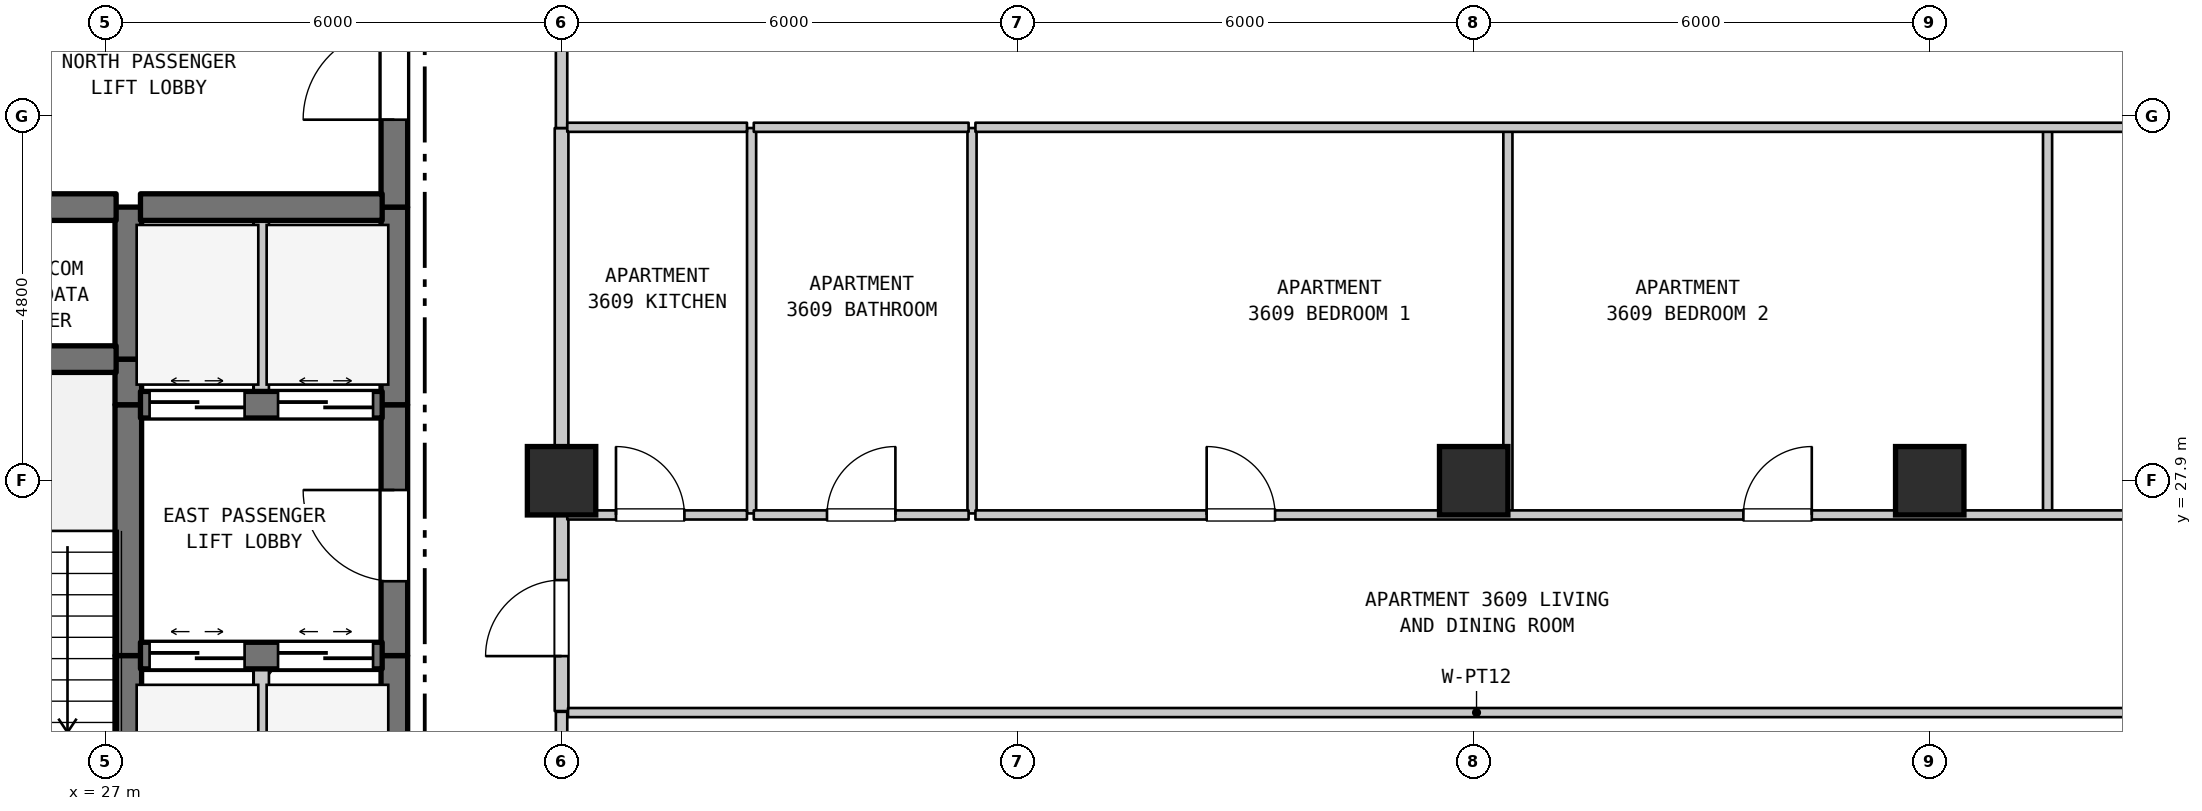
"""IFC4 building model, lengths in metres.
Left out: names, types, materials, properties, quantities, classifications, styles, units other than length and angle.
Written with IfcOpenShell. Run it as: python <this file> out.ifc"""

import sys

from ifc_helpers import new_model, si_unit, direction, frame, frame_2d, origin, origin_2d, place, context, subcontext, project, spatial, rectangle, extrude, element, fill, save


model = new_model("IFC4")
c1 = context("Model", 3, precision=1e-05, world=origin(), true_north=direction((0.0, 1.0)))
c2 = subcontext(c1, "Body", "Model", "MODEL_VIEW")
j1 = project(units=[si_unit("LENGTHUNIT", "METRE"), si_unit("PLANEANGLEUNIT", "RADIAN")], contexts=[c1])
p1 = place(None, origin())
s1 = spatial("IfcSite", under=j1, at=p1, CompositionType="ELEMENT")
p2 = place(p1, origin())
s2 = spatial("IfcBuilding", under=s1, at=p2, CompositionType="ELEMENT")
p3 = place(p2, frame((0.0, 0.0, 148.3)))
s3 = spatial("IfcBuildingStorey", under=s2, at=p3, CompositionType="ELEMENT", Elevation=148.3)
for number, where, z_axis, x_axis in (
    (1, (33.0, 27.9, 0.0), (0.0, 0.0, 1.0), (1.0, 0.0, 0.0)),
    (2, (45.0, 27.9, 0.0), (0.0, 0.0, 1.0), (1.0, 0.0, 0.0)),
    (3, (51.0, 27.9, 0.0), (0.0, 0.0, 1.0), (1.0, 0.0, 0.0)),
):
    element("IfcColumn", number, at=place(p3, frame(where, z_axis=z_axis, x_axis=x_axis)), inside=s3, PredefinedType="COLUMN", context=c2, shape_type="SweptSolid", body=[
        extrude(rectangle(XDim=0.9, YDim=0.9, at=origin_2d()), origin(), (0.0, 0.0, 1.0), 3.7),
    ])
p4 = place(p3, frame((27.3, 22.7, 0.0), z_axis=(0.0, 0.0, 1.0), x_axis=(0.0, 1.0, 0.0)))
e4 = element("IfcWall", 4, at=p4, inside=s3, PredefinedType="SHEAR", context=c2, shape_type="SweptSolid", body=[
    extrude(rectangle(XDim=2.9, YDim=0.35, at=frame_2d((1.45, 0.0))), origin(), (0.0, 0.0, 1.0), 3.385),
])
p5 = place(p3, frame((27.3, 25.6, 0.0), z_axis=(0.0, 0.0, 1.0), x_axis=(0.0, 1.0, 0.0)))
e5 = element("IfcWall", 5, at=p5, inside=s3, PredefinedType="SHEAR", context=c2, shape_type="SweptSolid", body=[
    extrude(rectangle(XDim=3.3, YDim=0.35, at=frame_2d((1.65, 0.0))), origin(), (0.0, 0.0, 1.0), 3.385),
])
p6 = place(p3, frame((27.3, 28.9, 0.0), z_axis=(0.0, 0.0, 1.0), x_axis=(0.0, 1.0, 0.0)))
e6 = element("IfcWall", 6, at=p6, inside=s3, PredefinedType="SHEAR", context=c2, shape_type="SweptSolid", body=[
    extrude(rectangle(XDim=0.6, YDim=0.35, at=frame_2d((0.3, 0.0))), origin(), (0.0, 0.0, 1.0), 3.385),
])
p7 = place(p3, frame((27.3, 29.5, 0.0), z_axis=(0.0, 0.0, 1.0), x_axis=(0.0, 1.0, 0.0)))
e7 = element("IfcWall", 7, at=p7, inside=s3, PredefinedType="SHEAR", context=c2, shape_type="SweptSolid", body=[
    extrude(rectangle(XDim=2.0, YDim=0.35, at=frame_2d((1.0, 0.0))), origin(), (0.0, 0.0, 1.0), 3.385),
])
p8 = place(p3, frame((29.05, 22.7, 0.0), z_axis=(0.0, 0.0, 1.0), x_axis=(0.0, 1.0, 0.0)))
e8 = element("IfcWall", 8, at=p8, inside=s3, PredefinedType="STANDARD", context=c2, shape_type="SweptSolid", body=[
    extrude(rectangle(XDim=2.9, YDim=0.2, at=frame_2d((1.45, 0.0))), origin(), (0.0, 0.0, 1.0), 3.385),
])
p9 = place(p3, frame((29.05, 28.9, 0.0), z_axis=(0.0, 0.0, 1.0), x_axis=(0.0, 1.0, 0.0)))
e9 = element("IfcWall", 9, at=p9, inside=s3, PredefinedType="STANDARD", context=c2, shape_type="SweptSolid", body=[
    extrude(rectangle(XDim=2.6, YDim=0.2, at=frame_2d((1.3, 0.0))), origin(), (0.0, 0.0, 1.0), 3.385),
])
p10 = place(p3, frame((30.8, 22.7, 0.0), z_axis=(0.0, 0.0, 1.0), x_axis=(0.0, 1.0, 0.0)))
e10 = element("IfcWall", 10, at=p10, inside=s3, PredefinedType="SHEAR", context=c2, shape_type="SweptSolid", body=[
    extrude(rectangle(XDim=2.9, YDim=0.35, at=frame_2d((1.45, 0.0))), origin(), (0.0, 0.0, 1.0), 3.385),
])
p11 = place(p3, frame((30.8, 25.6, 0.0), z_axis=(0.0, 0.0, 1.0), x_axis=(0.0, 1.0, 0.0)))
e11 = element("IfcWall", 11, at=p11, inside=s3, PredefinedType="SHEAR", context=c2, shape_type="SweptSolid", body=[
    extrude(rectangle(XDim=3.3, YDim=0.35, at=frame_2d((1.65, 0.0))), origin(), (0.0, 0.0, 1.0), 3.385),
])
p12 = place(p11, frame((0.978, 0.0, 0.0)))
e12 = element("IfcOpeningElement", 12, at=p12, cuts=e11, PredefinedType="OPENING", context=c2, shape_type="SweptSolid", body=[
    extrude(rectangle(XDim=1.2, YDim=2.2, at=frame_2d((0.6, 1.1))), frame((0.0, 0.185, 0.0), z_axis=(0.0, -1.0, 0.0), x_axis=(1.0, 0.0, 0.0)), (0.0, 0.0, 1.0), 0.37),
])
p13 = place(p3, frame((30.8, 28.9, 0.0), z_axis=(0.0, 0.0, 1.0), x_axis=(0.0, 1.0, 0.0)))
e13 = element("IfcWall", 13, at=p13, inside=s3, PredefinedType="SHEAR", context=c2, shape_type="SweptSolid", body=[
    extrude(rectangle(XDim=2.6, YDim=0.35, at=frame_2d((1.3, 0.0))), origin(), (0.0, 0.0, 1.0), 3.385),
])
p14 = place(p3, frame((30.8, 31.5, 0.0), z_axis=(0.0, 0.0, 1.0), x_axis=(0.0, 1.0, 0.0)))
e14 = element("IfcWall", 14, at=p14, inside=s3, PredefinedType="SHEAR", context=c2, shape_type="SweptSolid", body=[
    extrude(rectangle(XDim=3.5, YDim=0.35, at=frame_2d((1.75, 0.0))), origin(), (0.0, 0.0, 1.0), 3.385),
])
p15 = place(p14, frame((1.15, 0.0, 0.0)))
e15 = element("IfcOpeningElement", 15, at=p15, cuts=e14, PredefinedType="OPENING", context=c2, shape_type="SweptSolid", body=[
    extrude(rectangle(XDim=1.2, YDim=2.2, at=frame_2d((0.6, 1.1))), frame((0.0, 0.185, 0.0), z_axis=(0.0, -1.0, 0.0), x_axis=(1.0, 0.0, 0.0)), (0.0, 0.0, 1.0), 0.37),
])
p16 = place(p3, frame((33.0, 19.51, 0.0), z_axis=(0.0, 0.0, 1.0), x_axis=(0.0, 1.0, 0.0)))
e16 = element("IfcWall", 16, at=p16, inside=s3, PredefinedType="STANDARD", context=c2, shape_type="SweptSolid", body=[
    extrude(rectangle(XDim=5.35, YDim=0.15, at=frame_2d((2.675, 0.0))), origin(), (0.0, 0.0, 1.0), 2.935),
])
p17 = place(p16, frame((1.534, 0.0, 0.0)))
e17 = element("IfcOpeningElement", 17, at=p17, cuts=e16, PredefinedType="OPENING", context=c2, shape_type="SweptSolid", body=[
    extrude(rectangle(XDim=1.0, YDim=2.15, at=frame_2d((0.5, 1.075))), frame((0.0, 0.085, 0.0), z_axis=(0.0, -1.0, 0.0), x_axis=(1.0, 0.0, 0.0)), (0.0, 0.0, 1.0), 0.17),
])
p18 = place(p3, frame((33.0, 24.87, 0.0), z_axis=(0.0, 0.0, 1.0), x_axis=(0.0, 1.0, 0.0)))
e18 = element("IfcWall", 18, at=p18, inside=s3, PredefinedType="STANDARD", context=c2, shape_type="SweptSolid", body=[
    extrude(rectangle(XDim=2.6, YDim=0.18, at=frame_2d((1.3, 0.0))), origin(), (0.0, 0.0, 1.0), 2.935),
])
p19 = place(p18, frame((0.723, 0.0, 0.0)))
e19 = element("IfcOpeningElement", 19, at=p19, cuts=e18, PredefinedType="OPENING", context=c2, shape_type="SweptSolid", body=[
    extrude(rectangle(XDim=1.0, YDim=2.15, at=frame_2d((0.5, 1.075))), frame((0.0, 0.1, 0.0), z_axis=(0.0, -1.0, 0.0), x_axis=(1.0, 0.0, 0.0)), (0.0, 0.0, 1.0), 0.2),
])
p20 = place(p3, frame((33.0, 27.47, 0.0), z_axis=(0.0, 0.0, 1.0), x_axis=(0.0, 1.0, 0.0)))
e20 = element("IfcWall", 20, at=p20, inside=s3, PredefinedType="STANDARD", context=c2, shape_type="SweptSolid", body=[
    extrude(rectangle(XDim=5.07, YDim=0.18, at=frame_2d((2.535, 0.0))), origin(), (0.0, 0.0, 1.0), 2.885),
])
p21 = place(p3, frame((33.0, 32.54, 0.0), z_axis=(0.0, 0.0, 1.0), x_axis=(0.0, 1.0, 0.0)))
e21 = element("IfcWall", 21, at=p21, inside=s3, PredefinedType="STANDARD", context=c2, shape_type="SweptSolid", body=[
    extrude(rectangle(XDim=5.36, YDim=0.15, at=frame_2d((2.68, 0.0))), origin(), (0.0, 0.0, 1.0), 2.885),
])
p22 = place(p21, frame((2.109, 0.0, 0.0)))
e22 = element("IfcOpeningElement", 22, at=p22, cuts=e21, PredefinedType="OPENING", context=c2, shape_type="SweptSolid", body=[
    extrude(rectangle(XDim=1.0, YDim=2.15, at=frame_2d((0.5, 1.075))), frame((0.0, 0.085, 0.0), z_axis=(0.0, -1.0, 0.0), x_axis=(1.0, 0.0, 0.0)), (0.0, 0.0, 1.0), 0.17),
])
for number, where, z_axis, x_axis in (
    (23, (35.5, 27.47, 0.0), (0.0, 0.0, 1.0), (0.0, 1.0, 0.0)),
    (24, (38.4, 27.47, 0.0), (0.0, 0.0, 1.0), (0.0, 1.0, 0.0)),
    (25, (45.45, 27.47, 0.0), (0.0, 0.0, 1.0), (0.0, 1.0, 0.0)),
    (26, (52.55, 27.47, 0.0), (0.0, 0.0, 1.0), (0.0, 1.0, 0.0)),
):
    element("IfcWall", number, at=place(p3, frame(where, z_axis=z_axis, x_axis=x_axis)), inside=s3, PredefinedType="PARTITIONING", context=c2, shape_type="SweptSolid", body=[
        extrude(rectangle(XDim=5.07, YDim=0.12, at=frame_2d((2.535, 0.0))), origin(), (0.0, 0.0, 1.0), 3.385),
    ])
p23 = place(p3, frame((33.085, 24.85, 0.0), z_axis=(0.0, 0.0, 1.0), x_axis=(1.0, 0.0, 0.0)))
e27 = element("IfcWall", 27, at=p23, inside=s3, PredefinedType="PARTITIONING", context=c2, shape_type="SweptSolid", body=[
    extrude(rectangle(XDim=23.905, YDim=0.12, at=frame_2d((11.953, 0.0))), origin(), (0.0, 0.0, 1.0), 3.385),
])
p24 = place(p3, frame((27.46, 25.6, 0.0), z_axis=(0.0, 0.0, 1.0), x_axis=(1.0, 0.0, 0.0)))
e28 = element("IfcWall", 28, at=p24, inside=s3, PredefinedType="SHEAR", context=c2, shape_type="SweptSolid", body=[
    extrude(rectangle(XDim=3.18, YDim=0.35, at=frame_2d((1.59, 0.0))), origin(), (0.0, 0.0, 1.0), 3.385),
])
p25 = place(p24, frame((0.12, 0.0, 0.0)))
e29 = element("IfcOpeningElement", 29, at=p25, cuts=e28, PredefinedType="OPENING", context=c2, shape_type="SweptSolid", body=[
    extrude(rectangle(XDim=1.25, YDim=2.2, at=frame_2d((0.625, 1.1))), frame((0.0, 0.185, 0.0), z_axis=(0.0, -1.0, 0.0), x_axis=(1.0, 0.0, 0.0)), (0.0, 0.0, 1.0), 0.37),
])
p26 = place(p24, frame((1.81, 0.0, 0.0)))
e30 = element("IfcOpeningElement", 30, at=p26, cuts=e28, PredefinedType="OPENING", context=c2, shape_type="SweptSolid", body=[
    extrude(rectangle(XDim=1.25, YDim=2.2, at=frame_2d((0.625, 1.1))), frame((0.0, 0.185, 0.0), z_axis=(0.0, -1.0, 0.0), x_axis=(1.0, 0.0, 0.0)), (0.0, 0.0, 1.0), 0.37),
])
p27 = place(p3, frame((33.075, 27.45, 0.0), z_axis=(0.0, 0.0, 1.0), x_axis=(1.0, 0.0, 0.0)))
e31 = element("IfcWall", 31, at=p27, inside=s3, PredefinedType="PARTITIONING", context=c2, shape_type="SweptSolid", body=[
    extrude(rectangle(XDim=2.364, YDim=0.12, at=frame_2d((1.182, 0.0))), origin(), (0.0, 0.0, 1.0), 3.385),
])
p28 = place(p27, frame((0.641, 0.0, 0.0)))
e32 = element("IfcOpeningElement", 32, at=p28, cuts=e31, PredefinedType="OPENING", context=c2, shape_type="SweptSolid", body=[
    extrude(rectangle(XDim=0.9, YDim=2.15, at=frame_2d((0.45, 1.075))), frame((0.0, 0.07, 0.0), z_axis=(0.0, -1.0, 0.0), x_axis=(1.0, 0.0, 0.0)), (0.0, 0.0, 1.0), 0.14),
])
p29 = place(p3, frame((35.529, 27.45, 0.0), z_axis=(0.0, 0.0, 1.0), x_axis=(1.0, 0.0, 0.0)))
e33 = element("IfcWall", 33, at=p29, inside=s3, PredefinedType="PARTITIONING", context=c2, shape_type="SweptSolid", body=[
    extrude(rectangle(XDim=2.826, YDim=0.12, at=frame_2d((1.413, 0.0))), origin(), (0.0, 0.0, 1.0), 3.385),
])
p30 = place(p29, frame((0.963, 0.0, 0.0)))
e34 = element("IfcOpeningElement", 34, at=p30, cuts=e33, PredefinedType="OPENING", context=c2, shape_type="SweptSolid", body=[
    extrude(rectangle(XDim=0.9, YDim=2.1, at=frame_2d((0.45, 1.05))), frame((0.0, 0.07, 0.0), z_axis=(0.0, -1.0, 0.0), x_axis=(1.0, 0.0, 0.0)), (0.0, 0.0, 1.0), 0.14),
])
p31 = place(p3, frame((38.445, 27.45, 0.0), z_axis=(0.0, 0.0, 1.0), x_axis=(1.0, 0.0, 0.0)))
e35 = element("IfcWall", 35, at=p31, inside=s3, PredefinedType="PARTITIONING", context=c2, shape_type="SweptSolid", body=[
    extrude(rectangle(XDim=18.545, YDim=0.12, at=frame_2d((9.272, 0.0))), origin(), (0.0, 0.0, 1.0), 3.385),
])
p32 = place(p31, frame((3.042, 0.0, 0.0)))
e36 = element("IfcOpeningElement", 36, at=p32, cuts=e35, PredefinedType="OPENING", context=c2, shape_type="SweptSolid", body=[
    extrude(rectangle(XDim=0.9, YDim=2.15, at=frame_2d((0.45, 1.075))), frame((0.0, 0.07, 0.0), z_axis=(0.0, -1.0, 0.0), x_axis=(1.0, 0.0, 0.0)), (0.0, 0.0, 1.0), 0.14),
])
p33 = place(p31, frame((10.103, 0.0, 0.0)))
e37 = element("IfcOpeningElement", 37, at=p33, cuts=e35, PredefinedType="OPENING", context=c2, shape_type="SweptSolid", body=[
    extrude(rectangle(XDim=0.9, YDim=2.15, at=frame_2d((0.45, 1.075))), frame((0.0, 0.07, 0.0), z_axis=(0.0, -1.0, 0.0), x_axis=(1.0, 0.0, 0.0)), (0.0, 0.0, 1.0), 0.14),
])
p34 = place(p31, frame((15.791, 0.0, 0.0)))
e38 = element("IfcOpeningElement", 38, at=p34, cuts=e35, PredefinedType="OPENING", context=c2, shape_type="SweptSolid", body=[
    extrude(rectangle(XDim=0.9, YDim=2.15, at=frame_2d((0.45, 1.075))), frame((0.0, 0.07, 0.0), z_axis=(0.0, -1.0, 0.0), x_axis=(1.0, 0.0, 0.0)), (0.0, 0.0, 1.0), 0.14),
])
p35 = place(p3, frame((27.46, 28.9, 0.0), z_axis=(0.0, 0.0, 1.0), x_axis=(1.0, 0.0, 0.0)))
e39 = element("IfcWall", 39, at=p35, inside=s3, PredefinedType="SHEAR", context=c2, shape_type="SweptSolid", body=[
    extrude(rectangle(XDim=3.18, YDim=0.35, at=frame_2d((1.59, 0.0))), origin(), (0.0, 0.0, 1.0), 3.385),
])
p36 = place(p35, frame((0.12, 0.0, 0.0)))
e40 = element("IfcOpeningElement", 40, at=p36, cuts=e39, PredefinedType="OPENING", context=c2, shape_type="SweptSolid", body=[
    extrude(rectangle(XDim=1.25, YDim=2.2, at=frame_2d((0.625, 1.1))), frame((0.0, 0.185, 0.0), z_axis=(0.0, -1.0, 0.0), x_axis=(1.0, 0.0, 0.0)), (0.0, 0.0, 1.0), 0.37),
])
p37 = place(p35, frame((1.81, 0.0, 0.0)))
e41 = element("IfcOpeningElement", 41, at=p37, cuts=e39, PredefinedType="OPENING", context=c2, shape_type="SweptSolid", body=[
    extrude(rectangle(XDim=1.25, YDim=2.2, at=frame_2d((0.625, 1.1))), frame((0.0, 0.185, 0.0), z_axis=(0.0, -1.0, 0.0), x_axis=(1.0, 0.0, 0.0)), (0.0, 0.0, 1.0), 0.37),
])
p38 = place(p3, frame((23.96, 29.5, 0.0), z_axis=(0.0, 0.0, 1.0), x_axis=(1.0, 0.0, 0.0)))
e42 = element("IfcWall", 42, at=p38, inside=s3, PredefinedType="SHEAR", context=c2, shape_type="SweptSolid", body=[
    extrude(rectangle(XDim=3.18, YDim=0.35, at=frame_2d((1.59, 0.0))), origin(), (0.0, 0.0, 1.0), 3.385),
])
p39 = place(p3, frame((23.96, 31.5, 0.0), z_axis=(0.0, 0.0, 1.0), x_axis=(1.0, 0.0, 0.0)))
e43 = element("IfcWall", 43, at=p39, inside=s3, PredefinedType="SHEAR", context=c2, shape_type="SweptSolid", body=[
    extrude(rectangle(XDim=3.18, YDim=0.35, at=frame_2d((1.59, 0.0))), origin(), (0.0, 0.0, 1.0), 3.385),
])
p40 = place(p39, frame((1.094, 0.0, 0.0)))
e44 = element("IfcOpeningElement", 44, at=p40, cuts=e43, PredefinedType="OPENING", context=c2, shape_type="SweptSolid", body=[
    extrude(rectangle(XDim=0.85, YDim=2.1, at=frame_2d((0.425, 1.05))), frame((0.0, 0.185, 0.0), z_axis=(0.0, -1.0, 0.0), x_axis=(1.0, 0.0, 0.0)), (0.0, 0.0, 1.0), 0.37),
])
p41 = place(p3, frame((27.46, 31.5, 0.0), z_axis=(0.0, 0.0, 1.0), x_axis=(1.0, 0.0, 0.0)))
e45 = element("IfcWall", 45, at=p41, inside=s3, PredefinedType="SHEAR", context=c2, shape_type="SweptSolid", body=[
    extrude(rectangle(XDim=3.18, YDim=0.35, at=frame_2d((1.59, 0.0))), origin(), (0.0, 0.0, 1.0), 3.385),
])
p42 = place(p3, frame((33.075, 32.55, 0.0), z_axis=(0.0, 0.0, 1.0), x_axis=(1.0, 0.0, 0.0)))
e46 = element("IfcWall", 46, at=p42, inside=s3, PredefinedType="PARTITIONING", context=c2, shape_type="SweptSolid", body=[
    extrude(rectangle(XDim=2.364, YDim=0.12, at=frame_2d((1.182, 0.0))), origin(), (0.0, 0.0, 1.0), 3.385),
])
p43 = place(p3, frame((35.529, 32.55, 0.0), z_axis=(0.0, 0.0, 1.0), x_axis=(1.0, 0.0, 0.0)))
e47 = element("IfcWall", 47, at=p43, inside=s3, PredefinedType="PARTITIONING", context=c2, shape_type="SweptSolid", body=[
    extrude(rectangle(XDim=2.826, YDim=0.12, at=frame_2d((1.413, 0.0))), origin(), (0.0, 0.0, 1.0), 3.385),
])
p44 = place(p3, frame((38.445, 32.55, 0.0), z_axis=(0.0, 0.0, 1.0), x_axis=(1.0, 0.0, 0.0)))
e48 = element("IfcWall", 48, at=p44, inside=s3, PredefinedType="PARTITIONING", context=c2, shape_type="SweptSolid", body=[
    extrude(rectangle(XDim=21.335, YDim=0.12, at=frame_2d((10.667, 0.0))), origin(), (0.0, 0.0, 1.0), 3.385),
])
p45 = place(p12, origin())
e49 = element("IfcDoor", 49, at=p45, inside=s3, OperationType="SINGLE_SWING_RIGHT", PredefinedType="DOOR", context=c2, shape_type="SweptSolid", body=[
    extrude(rectangle(XDim=1.2, YDim=2.2, at=frame_2d((0.6, 1.1))), frame((0.0, 0.025, 0.0), z_axis=(0.0, -1.0, 0.0), x_axis=(1.0, 0.0, 0.0)), (0.0, 0.0, 1.0), 0.05),
])
fill(e12, e49)
p46 = place(p15, origin())
e50 = element("IfcDoor", 50, at=p46, inside=s3, OperationType="SINGLE_SWING_LEFT", PredefinedType="DOOR", context=c2, shape_type="SweptSolid", body=[
    extrude(rectangle(XDim=1.2, YDim=2.2, at=frame_2d((0.6, 1.1))), frame((0.0, 0.025, 0.0), z_axis=(0.0, -1.0, 0.0), x_axis=(1.0, 0.0, 0.0)), (0.0, 0.0, 1.0), 0.05),
])
fill(e15, e50)
p47 = place(p19, origin())
e51 = element("IfcDoor", 51, at=p47, inside=s3, OperationType="SINGLE_SWING_LEFT", PredefinedType="DOOR", context=c2, shape_type="SweptSolid", body=[
    extrude(rectangle(XDim=1.0, YDim=2.15, at=frame_2d((0.5, 1.075))), frame((0.0, 0.025, 0.0), z_axis=(0.0, -1.0, 0.0), x_axis=(1.0, 0.0, 0.0)), (0.0, 0.0, 1.0), 0.05),
])
fill(e19, e51)
p48 = place(p25, origin())
e52 = element("IfcDoor", 52, at=p48, inside=s3, OperationType="DOUBLE_DOOR_SLIDING", PredefinedType="DOOR", context=c2, shape_type="SweptSolid", body=[
    extrude(rectangle(XDim=1.25, YDim=2.2, at=frame_2d((0.625, 1.1))), frame((0.0, 0.025, 0.0), z_axis=(0.0, -1.0, 0.0), x_axis=(1.0, 0.0, 0.0)), (0.0, 0.0, 1.0), 0.05),
])
fill(e29, e52)
p49 = place(p26, origin())
e53 = element("IfcDoor", 53, at=p49, inside=s3, OperationType="DOUBLE_DOOR_SLIDING", PredefinedType="DOOR", context=c2, shape_type="SweptSolid", body=[
    extrude(rectangle(XDim=1.25, YDim=2.2, at=frame_2d((0.625, 1.1))), frame((0.0, 0.025, 0.0), z_axis=(0.0, -1.0, 0.0), x_axis=(1.0, 0.0, 0.0)), (0.0, 0.0, 1.0), 0.05),
])
fill(e30, e53)
p50 = place(p28, origin())
e54 = element("IfcDoor", 54, at=p50, inside=s3, OperationType="SINGLE_SWING_LEFT", PredefinedType="DOOR", context=c2, shape_type="SweptSolid", body=[
    extrude(rectangle(XDim=0.9, YDim=2.15, at=frame_2d((0.45, 1.075))), frame((0.0, 0.025, 0.0), z_axis=(0.0, -1.0, 0.0), x_axis=(1.0, 0.0, 0.0)), (0.0, 0.0, 1.0), 0.05),
])
fill(e32, e54)
p51 = place(p30, origin())
e55 = element("IfcDoor", 55, at=p51, inside=s3, OperationType="SINGLE_SWING_RIGHT", PredefinedType="DOOR", context=c2, shape_type="SweptSolid", body=[
    extrude(rectangle(XDim=0.9, YDim=2.1, at=frame_2d((0.45, 1.05))), frame((0.0, 0.025, 0.0), z_axis=(0.0, -1.0, 0.0), x_axis=(1.0, 0.0, 0.0)), (0.0, 0.0, 1.0), 0.05),
])
fill(e34, e55)
p52 = place(p32, origin())
e56 = element("IfcDoor", 56, at=p52, inside=s3, OperationType="SINGLE_SWING_LEFT", PredefinedType="DOOR", context=c2, shape_type="SweptSolid", body=[
    extrude(rectangle(XDim=0.9, YDim=2.15, at=frame_2d((0.45, 1.075))), frame((0.0, 0.025, 0.0), z_axis=(0.0, -1.0, 0.0), x_axis=(1.0, 0.0, 0.0)), (0.0, 0.0, 1.0), 0.05),
])
fill(e36, e56)
p53 = place(p33, origin())
e57 = element("IfcDoor", 57, at=p53, inside=s3, OperationType="SINGLE_SWING_RIGHT", PredefinedType="DOOR", context=c2, shape_type="SweptSolid", body=[
    extrude(rectangle(XDim=0.9, YDim=2.15, at=frame_2d((0.45, 1.075))), frame((0.0, 0.025, 0.0), z_axis=(0.0, -1.0, 0.0), x_axis=(1.0, 0.0, 0.0)), (0.0, 0.0, 1.0), 0.05),
])
fill(e37, e57)
p54 = place(p36, origin())
e58 = element("IfcDoor", 58, at=p54, inside=s3, OperationType="DOUBLE_DOOR_SLIDING", PredefinedType="DOOR", context=c2, shape_type="SweptSolid", body=[
    extrude(rectangle(XDim=1.25, YDim=2.2, at=frame_2d((0.625, 1.1))), frame((0.0, 0.025, 0.0), z_axis=(0.0, -1.0, 0.0), x_axis=(1.0, 0.0, 0.0)), (0.0, 0.0, 1.0), 0.05),
])
fill(e40, e58)
p55 = place(p37, origin())
e59 = element("IfcDoor", 59, at=p55, inside=s3, OperationType="DOUBLE_DOOR_SLIDING", PredefinedType="DOOR", context=c2, shape_type="SweptSolid", body=[
    extrude(rectangle(XDim=1.25, YDim=2.2, at=frame_2d((0.625, 1.1))), frame((0.0, 0.025, 0.0), z_axis=(0.0, -1.0, 0.0), x_axis=(1.0, 0.0, 0.0)), (0.0, 0.0, 1.0), 0.05),
])
fill(e41, e59)
save(model, sys.argv[1])
